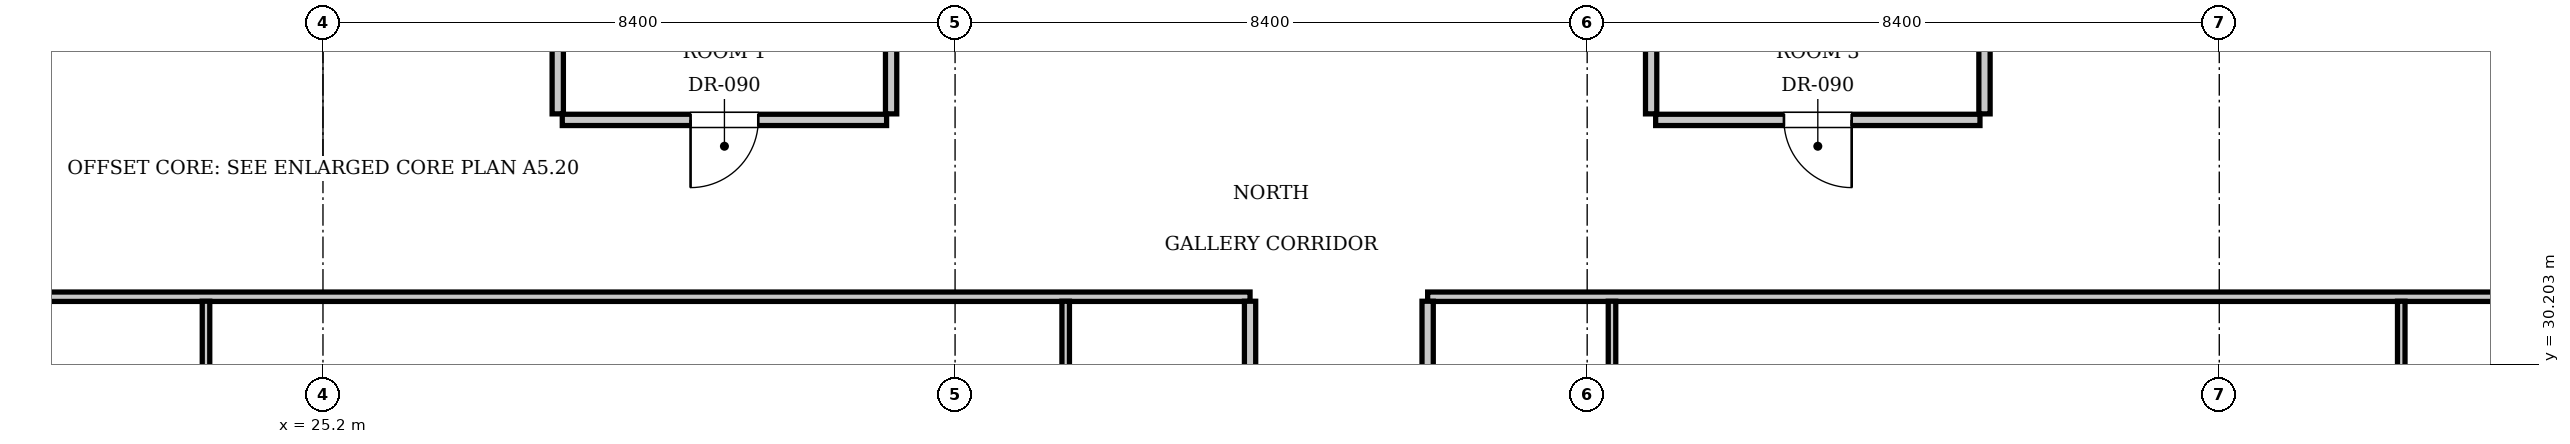
"""IFC4 building model, lengths in metres.
Left out: names, types, materials, properties, quantities, classifications, styles, units other than length and angle.
Written with IfcOpenShell. Run it as: python <this file> out.ifc"""

import sys

from ifc_helpers import new_model, si_unit, direction, frame, frame_2d, origin, place, context, subcontext, project, spatial, rectangle, extrude, element, fill, save


model = new_model("IFC4")
c1 = context("Model", 3, precision=1e-05, world=origin(), true_north=direction((0.0, 1.0)))
c2 = subcontext(c1, "Body", "Model", "MODEL_VIEW")
j1 = project(units=[si_unit("LENGTHUNIT", "METRE"), si_unit("PLANEANGLEUNIT", "RADIAN")], contexts=[c1])
p1 = place(None, origin())
s1 = spatial("IfcSite", under=j1, at=p1, CompositionType="ELEMENT")
p2 = place(p1, origin())
s2 = spatial("IfcBuilding", under=s1, at=p2, CompositionType="ELEMENT")
p3 = place(p2, frame((0.0, 0.0, 173.6)))
s3 = spatial("IfcBuildingStorey", under=s2, at=p3, CompositionType="ELEMENT", Elevation=173.6)
for number, where, z_axis, x_axis in (
    (1, (28.32, 33.53, 0.0), (0.0, 0.0, 1.0), (0.0, 1.0, 0.0)),
    (2, (32.75, 33.53, 0.0), (0.0, 0.0, 1.0), (0.0, 1.0, 0.0)),
):
    element("IfcWall", number, at=place(p3, frame(where, z_axis=z_axis, x_axis=x_axis)), inside=s3, PredefinedType="PARTITIONING", context=c2, shape_type="SweptSolid", body=[
        extrude(rectangle(XDim=2.59, YDim=0.15, at=frame_2d((1.295, 0.0))), origin(), (0.0, 0.0, 1.0), 3.61),
    ])
p4 = place(p3, frame((28.38, 33.45, 0.0), z_axis=(0.0, 0.0, 1.0), x_axis=(1.0, 0.0, 0.0)))
e3 = element("IfcWall", 3, at=p4, inside=s3, PredefinedType="PARTITIONING", context=c2, shape_type="SweptSolid", body=[
    extrude(rectangle(XDim=4.31, YDim=0.15, at=frame_2d((2.155, 0.0))), origin(), (0.0, 0.0, 1.0), 3.61),
])
p5 = place(p4, frame((1.705, 0.0, 0.0)))
e4 = element("IfcOpeningElement", 4, at=p5, cuts=e3, PredefinedType="OPENING", context=c2, shape_type="SweptSolid", body=[
    extrude(rectangle(XDim=0.9, YDim=2.1, at=frame_2d((0.45, 1.05))), frame((0.0, 0.085, 0.0), z_axis=(0.0, -1.0, 0.0), x_axis=(1.0, 0.0, 0.0)), (0.0, 0.0, 1.0), 0.17),
])
for number, where, z_axis, x_axis in (
    (5, (42.85, 33.53, 0.0), (0.0, 0.0, 1.0), (0.0, 1.0, 0.0)),
    (6, (47.28, 33.53, 0.0), (0.0, 0.0, 1.0), (0.0, 1.0, 0.0)),
):
    element("IfcWall", number, at=place(p3, frame(where, z_axis=z_axis, x_axis=x_axis)), inside=s3, PredefinedType="PARTITIONING", context=c2, shape_type="SweptSolid", body=[
        extrude(rectangle(XDim=2.59, YDim=0.15, at=frame_2d((1.295, 0.0))), origin(), (0.0, 0.0, 1.0), 3.61),
    ])
p6 = place(p3, frame((42.91, 33.45, 0.0), z_axis=(0.0, 0.0, 1.0), x_axis=(1.0, 0.0, 0.0)))
e7 = element("IfcWall", 7, at=p6, inside=s3, PredefinedType="PARTITIONING", context=c2, shape_type="SweptSolid", body=[
    extrude(rectangle(XDim=4.31, YDim=0.15, at=frame_2d((2.155, 0.0))), origin(), (0.0, 0.0, 1.0), 3.61),
])
p7 = place(p6, frame((1.705, 0.0, 0.0)))
e8 = element("IfcOpeningElement", 8, at=p7, cuts=e7, PredefinedType="OPENING", context=c2, shape_type="SweptSolid", body=[
    extrude(rectangle(XDim=0.9, YDim=2.1, at=frame_2d((0.45, 1.05))), frame((0.0, 0.085, 0.0), z_axis=(0.0, -1.0, 0.0), x_axis=(1.0, 0.0, 0.0)), (0.0, 0.0, 1.0), 0.17),
])
p8 = place(p3, frame((13.2, 31.1, 0.0), z_axis=(0.0, 0.0, 1.0), x_axis=(1.0, 0.0, 0.0)))
e9 = element("IfcWall", 9, at=p8, inside=s3, PredefinedType="PARTITIONING", context=c2, shape_type="SweptSolid", body=[
    extrude(rectangle(XDim=24.32, YDim=0.125, at=frame_2d((12.16, 0.0))), origin(), (0.0, 0.0, 1.0), 3.61),
])
p9 = place(p3, frame((39.88, 31.1, 0.0), z_axis=(0.0, 0.0, 1.0), x_axis=(1.0, 0.0, 0.0)))
e10 = element("IfcWall", 10, at=p9, inside=s3, PredefinedType="PARTITIONING", context=c2, shape_type="SweptSolid", body=[
    extrude(rectangle(XDim=22.52, YDim=0.125, at=frame_2d((11.26, 0.0))), origin(), (0.0, 0.0, 1.0), 3.61),
])
p10 = place(p3, frame((37.52, 29.15, 0.0), z_axis=(0.0, 0.0, 1.0), x_axis=(0.0, 1.0, 0.0)))
e11 = element("IfcWall", 11, at=p10, inside=s3, PredefinedType="PARTITIONING", context=c2, shape_type="SweptSolid", body=[
    extrude(rectangle(XDim=1.89, YDim=0.15, at=frame_2d((0.945, 0.0))), origin(), (0.0, 0.0, 1.0), 3.61),
])
p11 = place(p3, frame((35.07, 29.15, 0.0), z_axis=(0.0, 0.0, 1.0), x_axis=(0.0, 1.0, 0.0)))
e12 = element("IfcWall", 12, at=p11, inside=s3, PredefinedType="PARTITIONING", context=c2, shape_type="SweptSolid", body=[
    extrude(rectangle(XDim=1.89, YDim=0.1, at=frame_2d((0.945, 0.0))), origin(), (0.0, 0.0, 1.0), 3.61),
])
p12 = place(p3, frame((23.646, 27.06, 0.0), z_axis=(0.0, 0.0, 1.0), x_axis=(0.0, 1.0, 0.0)))
e13 = element("IfcWall", 13, at=p12, inside=s3, PredefinedType="PARTITIONING", context=c2, shape_type="SweptSolid", body=[
    extrude(rectangle(XDim=3.98, YDim=0.1, at=frame_2d((1.99, 0.0))), origin(), (0.0, 0.0, 1.0), 3.61),
])
p13 = place(p12, frame((1.54, 0.0, 0.0)))
e14 = element("IfcOpeningElement", 14, at=p13, cuts=e13, PredefinedType="OPENING", context=c2, shape_type="SweptSolid", body=[
    extrude(rectangle(XDim=0.9, YDim=2.1, at=frame_2d((0.45, 1.05))), frame((0.0, 0.06, 0.0), z_axis=(0.0, -1.0, 0.0), x_axis=(1.0, 0.0, 0.0)), (0.0, 0.0, 1.0), 0.12),
])
p14 = place(p3, frame((39.88, 29.15, 0.0), z_axis=(0.0, 0.0, 1.0), x_axis=(0.0, 1.0, 0.0)))
e15 = element("IfcWall", 15, at=p14, inside=s3, PredefinedType="PARTITIONING", context=c2, shape_type="SweptSolid", body=[
    extrude(rectangle(XDim=1.89, YDim=0.15, at=frame_2d((0.945, 0.0))), origin(), (0.0, 0.0, 1.0), 3.61),
])
p15 = place(p3, frame((42.33, 29.15, 0.0), z_axis=(0.0, 0.0, 1.0), x_axis=(0.0, 1.0, 0.0)))
e16 = element("IfcWall", 16, at=p15, inside=s3, PredefinedType="PARTITIONING", context=c2, shape_type="SweptSolid", body=[
    extrude(rectangle(XDim=1.89, YDim=0.1, at=frame_2d((0.945, 0.0))), origin(), (0.0, 0.0, 1.0), 3.61),
])
p16 = place(p3, frame((52.818, 27.06, 0.0), z_axis=(0.0, 0.0, 1.0), x_axis=(0.0, 1.0, 0.0)))
e17 = element("IfcWall", 17, at=p16, inside=s3, PredefinedType="PARTITIONING", context=c2, shape_type="SweptSolid", body=[
    extrude(rectangle(XDim=3.98, YDim=0.1, at=frame_2d((1.99, 0.0))), origin(), (0.0, 0.0, 1.0), 3.61),
])
p17 = place(p16, frame((1.54, 0.0, 0.0)))
e18 = element("IfcOpeningElement", 18, at=p17, cuts=e17, PredefinedType="OPENING", context=c2, shape_type="SweptSolid", body=[
    extrude(rectangle(XDim=0.9, YDim=2.1, at=frame_2d((0.45, 1.05))), frame((0.0, 0.06, 0.0), z_axis=(0.0, -1.0, 0.0), x_axis=(1.0, 0.0, 0.0)), (0.0, 0.0, 1.0), 0.12),
])
p18 = place(p5, frame((0.9, 0.0, 0.0), z_axis=(0.0, 0.0, 1.0), x_axis=(-1.0, 0.0, 0.0)))
e19 = element("IfcDoor", 19, at=p18, inside=s3, OperationType="SINGLE_SWING_RIGHT", PredefinedType="DOOR", context=c2, shape_type="SweptSolid", body=[
    extrude(rectangle(XDim=0.9, YDim=2.1, at=frame_2d((0.45, 1.05))), frame((0.0, 0.025, 0.0), z_axis=(0.0, -1.0, 0.0), x_axis=(1.0, 0.0, 0.0)), (0.0, 0.0, 1.0), 0.05),
])
fill(e4, e19)
p19 = place(p7, frame((0.9, 0.0, 0.0), z_axis=(0.0, 0.0, 1.0), x_axis=(-1.0, 0.0, 0.0)))
e20 = element("IfcDoor", 20, at=p19, inside=s3, OperationType="SINGLE_SWING_LEFT", PredefinedType="DOOR", context=c2, shape_type="SweptSolid", body=[
    extrude(rectangle(XDim=0.9, YDim=2.1, at=frame_2d((0.45, 1.05))), frame((0.0, 0.025, 0.0), z_axis=(0.0, -1.0, 0.0), x_axis=(1.0, 0.0, 0.0)), (0.0, 0.0, 1.0), 0.05),
])
fill(e8, e20)
save(model, sys.argv[1])
